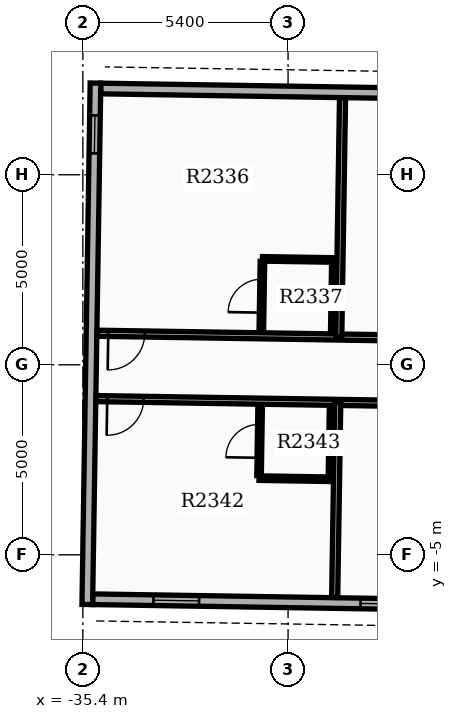
"""IFC4 building model, lengths in metres.
Left out: names, types, materials, properties, quantities, classifications, styles, units other than length and angle.
Written with IfcOpenShell. Run it as: python <this file> out.ifc"""

import sys

from ifc_helpers import new_model, si_unit, direction, frame, frame_2d, origin, place, context, subcontext, project, spatial, rectangle, extrude, element, fill, save


model = new_model("IFC4")
c1 = context("Model", 3, precision=1e-05, world=origin(), true_north=direction((0.0, 1.0)))
c2 = subcontext(c1, "Body", "Model", "MODEL_VIEW")
j1 = project(units=[si_unit("LENGTHUNIT", "METRE"), si_unit("PLANEANGLEUNIT", "RADIAN")], contexts=[c1])
p1 = place(None, origin())
s1 = spatial("IfcSite", under=j1, at=p1, CompositionType="ELEMENT")
p2 = place(p1, origin())
s2 = spatial("IfcBuilding", under=s1, at=p2, CompositionType="ELEMENT")
p3 = place(p2, frame((0.0, 0.0, 148.8)))
s3 = spatial("IfcBuildingStorey", under=s2, at=p3, CompositionType="ELEMENT", Elevation=148.8)
p4 = place(p3, frame((-14.833, 6.954, 0.0), z_axis=(0.0, 0.0, 1.0), x_axis=(-0.999876667941, 0.015705059908, 0.0)))
e1 = element("IfcWall", 1, at=p4, inside=s3, PredefinedType="STANDARD", context=c2, shape_type="SweptSolid", body=[
    extrude(rectangle(XDim=20.1, YDim=0.28, at=frame_2d((10.05, 0.0))), origin(), (0.0, 0.0, 1.0), 2.97),
])
p5 = place(p4, frame((1.6, 0.0, 0.8)))
e2 = element("IfcOpeningElement", 2, at=p5, cuts=e1, PredefinedType="OPENING", context=c2, shape_type="SweptSolid", body=[
    extrude(rectangle(XDim=1.2, YDim=1.6, at=frame_2d((0.6, 0.8))), frame((0.0, 0.15, 0.0), z_axis=(0.0, -1.0, 0.0), x_axis=(1.0, 0.0, 0.0)), (0.0, 0.0, 1.0), 0.3),
])
p6 = place(p4, frame((4.8, 0.0, 0.8)))
e3 = element("IfcOpeningElement", 3, at=p6, cuts=e1, PredefinedType="OPENING", context=c2, shape_type="SweptSolid", body=[
    extrude(rectangle(XDim=1.2, YDim=1.6, at=frame_2d((0.6, 0.8))), frame((0.0, 0.15, 0.0), z_axis=(0.0, -1.0, 0.0), x_axis=(1.0, 0.0, 0.0)), (0.0, 0.0, 1.0), 0.3),
])
p7 = place(p4, frame((8.0, 0.0, 0.8)))
e4 = element("IfcOpeningElement", 4, at=p7, cuts=e1, PredefinedType="OPENING", context=c2, shape_type="SweptSolid", body=[
    extrude(rectangle(XDim=1.2, YDim=1.6, at=frame_2d((0.6, 0.8))), frame((0.0, 0.15, 0.0), z_axis=(0.0, -1.0, 0.0), x_axis=(1.0, 0.0, 0.0)), (0.0, 0.0, 1.0), 0.3),
])
p8 = place(p4, frame((11.2, 0.0, 0.8)))
e5 = element("IfcOpeningElement", 5, at=p8, cuts=e1, PredefinedType="OPENING", context=c2, shape_type="SweptSolid", body=[
    extrude(rectangle(XDim=1.2, YDim=1.6, at=frame_2d((0.6, 0.8))), frame((0.0, 0.15, 0.0), z_axis=(0.0, -1.0, 0.0), x_axis=(1.0, 0.0, 0.0)), (0.0, 0.0, 1.0), 0.3),
])
p9 = place(p3, frame((-35.141, -6.169, 0.0), z_axis=(0.0, 0.0, 1.0), x_axis=(0.999876474133, -0.01571739401, 0.0)))
e6 = element("IfcWall", 6, at=p9, inside=s3, PredefinedType="STANDARD", context=c2, shape_type="SweptSolid", body=[
    extrude(rectangle(XDim=20.1, YDim=0.28, at=frame_2d((10.05, 0.0))), origin(), (0.0, 0.0, 1.0), 2.97),
])
p10 = place(p9, frame((1.6, 0.0, 0.8)))
e7 = element("IfcOpeningElement", 7, at=p10, cuts=e6, PredefinedType="OPENING", context=c2, shape_type="SweptSolid", body=[
    extrude(rectangle(XDim=1.2, YDim=1.6, at=frame_2d((0.6, 0.8))), frame((0.0, 0.15, 0.0), z_axis=(0.0, -1.0, 0.0), x_axis=(1.0, 0.0, 0.0)), (0.0, 0.0, 1.0), 0.3),
])
p11 = place(p9, frame((7.05, 0.0, 0.8)))
e8 = element("IfcOpeningElement", 8, at=p11, cuts=e6, PredefinedType="OPENING", context=c2, shape_type="SweptSolid", body=[
    extrude(rectangle(XDim=1.2, YDim=1.6, at=frame_2d((0.6, 0.8))), frame((0.0, 0.15, 0.0), z_axis=(0.0, -1.0, 0.0), x_axis=(1.0, 0.0, 0.0)), (0.0, 0.0, 1.0), 0.3),
])
p12 = place(p9, frame((10.25, 0.0, 0.8)))
e9 = element("IfcOpeningElement", 9, at=p12, cuts=e6, PredefinedType="OPENING", context=c2, shape_type="SweptSolid", body=[
    extrude(rectangle(XDim=1.2, YDim=1.6, at=frame_2d((0.6, 0.8))), frame((0.0, 0.15, 0.0), z_axis=(0.0, -1.0, 0.0), x_axis=(1.0, 0.0, 0.0)), (0.0, 0.0, 1.0), 0.3),
])
p13 = place(p9, frame((13.95, 0.0, 0.8)))
e10 = element("IfcOpeningElement", 10, at=p13, cuts=e6, PredefinedType="OPENING", context=c2, shape_type="SweptSolid", body=[
    extrude(rectangle(XDim=1.2, YDim=1.6, at=frame_2d((0.6, 0.8))), frame((0.0, 0.15, 0.0), z_axis=(0.0, -1.0, 0.0), x_axis=(1.0, 0.0, 0.0)), (0.0, 0.0, 1.0), 0.3),
])
p14 = place(p3, frame((-35.068, 7.412, 0.0), z_axis=(0.0, 0.0, 1.0), x_axis=(-0.015712599986, -0.999876549481, 0.0)))
e11 = element("IfcWall", 11, at=p14, inside=s3, PredefinedType="STANDARD", context=c2, shape_type="SweptSolid", body=[
    extrude(rectangle(XDim=13.72, YDim=0.28, at=frame_2d((6.86, 0.0))), origin(), (0.0, 0.0, 1.0), 2.97),
])
p15 = place(p14, frame((0.85, 0.0, 0.85)))
e12 = element("IfcOpeningElement", 12, at=p15, cuts=e11, PredefinedType="OPENING", context=c2, shape_type="SweptSolid", body=[
    extrude(rectangle(XDim=1.0, YDim=1.5, at=frame_2d((0.5, 0.75))), frame((0.0, 0.15, 0.0), z_axis=(0.0, -1.0, 0.0), x_axis=(1.0, 0.0, 0.0)), (0.0, 0.0, 1.0), 0.3),
])
p16 = place(p3, frame((-14.844, 0.513, 0.0), z_axis=(0.0, 0.0, 1.0), x_axis=(-0.999876717676, 0.015701893165, 0.0)))
e13 = element("IfcWall", 13, at=p16, inside=s3, PredefinedType="PARTITIONING", context=c2, shape_type="SweptSolid", body=[
    extrude(rectangle(XDim=20.182, YDim=0.16, at=frame_2d((10.091, 0.0))), origin(), (0.0, 0.0, 1.0), 2.96),
])
p17 = place(p16, frame((2.661, 0.0, 0.0)))
e14 = element("IfcOpeningElement", 14, at=p17, cuts=e13, PredefinedType="OPENING", context=c2, shape_type="SweptSolid", body=[
    extrude(rectangle(XDim=0.96, YDim=2.15, at=frame_2d((0.48, 1.075))), frame((0.0, 0.09, 0.0), z_axis=(0.0, -1.0, 0.0), x_axis=(1.0, 0.0, 0.0)), (0.0, 0.0, 1.0), 0.18),
])
p18 = place(p16, frame((9.492, 0.0, 0.0)))
e15 = element("IfcOpeningElement", 15, at=p18, cuts=e13, PredefinedType="OPENING", context=c2, shape_type="SweptSolid", body=[
    extrude(rectangle(XDim=0.96, YDim=2.15, at=frame_2d((0.48, 1.075))), frame((0.0, 0.09, 0.0), z_axis=(0.0, -1.0, 0.0), x_axis=(1.0, 0.0, 0.0)), (0.0, 0.0, 1.0), 0.18),
])
p19 = place(p16, frame((18.93, 0.0, 0.0)))
e16 = element("IfcOpeningElement", 16, at=p19, cuts=e13, PredefinedType="OPENING", context=c2, shape_type="SweptSolid", body=[
    extrude(rectangle(XDim=0.96, YDim=2.15, at=frame_2d((0.48, 1.075))), frame((0.0, 0.09, 0.0), z_axis=(0.0, -1.0, 0.0), x_axis=(1.0, 0.0, 0.0)), (0.0, 0.0, 1.0), 0.18),
])
p20 = place(p3, frame((-28.666, 0.73, 0.0), z_axis=(0.0, 0.0, 1.0), x_axis=(0.01571522764, 0.999876508185, 0.0)))
e17 = element("IfcWall", 17, at=p20, inside=s3, PredefinedType="PARTITIONING", context=c2, shape_type="SweptSolid", body=[
    extrude(rectangle(XDim=6.292, YDim=0.16, at=frame_2d((3.146, 0.0))), origin(), (0.0, 0.0, 1.0), 2.96),
])
p21 = place(p3, frame((-30.704, 0.902, 0.0), z_axis=(0.0, 0.0, 1.0), x_axis=(0.015694337248, 0.999876836305, 0.0)))
e18 = element("IfcWall", 18, at=p21, inside=s3, PredefinedType="PARTITIONING", context=c2, shape_type="SweptSolid", body=[
    extrude(rectangle(XDim=1.82, YDim=0.12, at=frame_2d((0.91, 0.0))), origin(), (0.0, 0.0, 1.0), 2.96),
])
p22 = place(p21, frame((0.47, 0.0, 0.0)))
e19 = element("IfcOpeningElement", 19, at=p22, cuts=e18, PredefinedType="OPENING", context=c2, shape_type="SweptSolid", body=[
    extrude(rectangle(XDim=0.88, YDim=2.1, at=frame_2d((0.44, 1.05))), frame((0.0, 0.07, 0.0), z_axis=(0.0, -1.0, 0.0), x_axis=(1.0, 0.0, 0.0)), (0.0, 0.0, 1.0), 0.14),
])
p23 = place(p3, frame((-28.824, 0.873, 0.0), z_axis=(0.0, 0.0, 1.0), x_axis=(0.015560230231, 0.999878932289, 0.0)))
e20 = element("IfcWall", 20, at=p23, inside=s3, PredefinedType="PARTITIONING", context=c2, shape_type="SweptSolid", body=[
    extrude(rectangle(XDim=1.82, YDim=0.12, at=frame_2d((0.91, 0.0))), origin(), (0.0, 0.0, 1.0), 2.96),
])
p24 = place(p3, frame((-28.794, 2.758, 0.0), z_axis=(0.0, 0.0, 1.0), x_axis=(-0.999876553475, 0.01571234584, 0.0)))
e21 = element("IfcWall", 21, at=p24, inside=s3, PredefinedType="PARTITIONING", context=c2, shape_type="SweptSolid", body=[
    extrude(rectangle(XDim=1.88, YDim=0.12, at=frame_2d((0.94, 0.0))), origin(), (0.0, 0.0, 1.0), 2.96),
])
p25 = place(p3, frame((-14.871, -1.207, 0.0), z_axis=(0.0, 0.0, 1.0), x_axis=(-0.999876527681, 0.015713987169, 0.0)))
e22 = element("IfcWall", 22, at=p25, inside=s3, PredefinedType="PARTITIONING", context=c2, shape_type="SweptSolid", body=[
    extrude(rectangle(XDim=20.182, YDim=0.16, at=frame_2d((10.091, 0.0))), origin(), (0.0, 0.0, 1.0), 2.96),
])
p26 = place(p25, frame((2.661, 0.0, 0.0)))
e23 = element("IfcOpeningElement", 23, at=p26, cuts=e22, PredefinedType="OPENING", context=c2, shape_type="SweptSolid", body=[
    extrude(rectangle(XDim=0.96, YDim=2.15, at=frame_2d((0.48, 1.075))), frame((0.0, 0.09, 0.0), z_axis=(0.0, -1.0, 0.0), x_axis=(1.0, 0.0, 0.0)), (0.0, 0.0, 1.0), 0.18),
])
p27 = place(p25, frame((9.492, 0.0, 0.0)))
e24 = element("IfcOpeningElement", 24, at=p27, cuts=e22, PredefinedType="OPENING", context=c2, shape_type="SweptSolid", body=[
    extrude(rectangle(XDim=0.96, YDim=2.15, at=frame_2d((0.48, 1.075))), frame((0.0, 0.09, 0.0), z_axis=(0.0, -1.0, 0.0), x_axis=(1.0, 0.0, 0.0)), (0.0, 0.0, 1.0), 0.18),
])
p28 = place(p25, frame((18.93, 0.0, 0.0)))
e25 = element("IfcOpeningElement", 25, at=p28, cuts=e22, PredefinedType="OPENING", context=c2, shape_type="SweptSolid", body=[
    extrude(rectangle(XDim=0.96, YDim=2.15, at=frame_2d((0.48, 1.075))), frame((0.0, 0.09, 0.0), z_axis=(0.0, -1.0, 0.0), x_axis=(1.0, 0.0, 0.0)), (0.0, 0.0, 1.0), 0.18),
])
p29 = place(p3, frame((-28.693, -0.99, 0.0), z_axis=(0.0, 0.0, 1.0), x_axis=(-0.015698892967, -0.999876764786, 0.0)))
e26 = element("IfcWall", 26, at=p29, inside=s3, PredefinedType="PARTITIONING", context=c2, shape_type="SweptSolid", body=[
    extrude(rectangle(XDim=5.132, YDim=0.16, at=frame_2d((2.566, 0.0))), origin(), (0.0, 0.0, 1.0), 2.96),
])
p30 = place(p3, frame((-30.764, -2.917, 0.0), z_axis=(0.0, 0.0, 1.0), x_axis=(0.015696442504, 0.999876803258, 0.0)))
e27 = element("IfcWall", 27, at=p30, inside=s3, PredefinedType="PARTITIONING", context=c2, shape_type="SweptSolid", body=[
    extrude(rectangle(XDim=1.82, YDim=0.12, at=frame_2d((0.91, 0.0))), origin(), (0.0, 0.0, 1.0), 2.96),
])
p31 = place(p30, frame((0.47, 0.0, 0.0)))
e28 = element("IfcOpeningElement", 28, at=p31, cuts=e27, PredefinedType="OPENING", context=c2, shape_type="SweptSolid", body=[
    extrude(rectangle(XDim=0.88, YDim=2.1, at=frame_2d((0.44, 1.05))), frame((0.0, 0.07, 0.0), z_axis=(0.0, -1.0, 0.0), x_axis=(1.0, 0.0, 0.0)), (0.0, 0.0, 1.0), 0.14),
])
p32 = place(p3, frame((-28.884, -2.947, 0.0), z_axis=(0.0, 0.0, 1.0), x_axis=(0.015694337248, 0.999876836305, 0.0)))
e29 = element("IfcWall", 29, at=p32, inside=s3, PredefinedType="PARTITIONING", context=c2, shape_type="SweptSolid", body=[
    extrude(rectangle(XDim=1.82, YDim=0.12, at=frame_2d((0.91, 0.0))), origin(), (0.0, 0.0, 1.0), 2.96),
])
p33 = place(p3, frame((-28.885, -3.012, 0.0), z_axis=(0.0, 0.0, 1.0), x_axis=(-0.99987652141, 0.015714386166, 0.0)))
e30 = element("IfcWall", 30, at=p33, inside=s3, PredefinedType="PARTITIONING", context=c2, shape_type="SweptSolid", body=[
    extrude(rectangle(XDim=1.88, YDim=0.12, at=frame_2d((0.94, 0.0))), origin(), (0.0, 0.0, 1.0), 2.96),
])
p34 = place(p10, origin())
e31 = element("IfcWindow", 31, at=p34, inside=s3, PartitioningType="SINGLE_PANEL", PredefinedType="WINDOW", context=c2, shape_type="SweptSolid", body=[
    extrude(rectangle(XDim=1.2, YDim=1.6, at=frame_2d((0.6, 0.8))), frame((0.0, 0.03, 0.0), z_axis=(0.0, -1.0, 0.0), x_axis=(1.0, 0.0, 0.0)), (0.0, 0.0, 1.0), 0.06),
])
fill(e7, e31)
p35 = place(p11, origin())
e32 = element("IfcWindow", 32, at=p35, inside=s3, PartitioningType="SINGLE_PANEL", PredefinedType="WINDOW", context=c2, shape_type="SweptSolid", body=[
    extrude(rectangle(XDim=1.2, YDim=1.6, at=frame_2d((0.6, 0.8))), frame((0.0, 0.03, 0.0), z_axis=(0.0, -1.0, 0.0), x_axis=(1.0, 0.0, 0.0)), (0.0, 0.0, 1.0), 0.06),
])
fill(e8, e32)
p36 = place(p15, origin())
e33 = element("IfcWindow", 33, at=p36, inside=s3, PartitioningType="SINGLE_PANEL", PredefinedType="WINDOW", context=c2, shape_type="SweptSolid", body=[
    extrude(rectangle(XDim=1.0, YDim=1.5, at=frame_2d((0.5, 0.75))), frame((0.0, 0.03, 0.0), z_axis=(0.0, -1.0, 0.0), x_axis=(1.0, 0.0, 0.0)), (0.0, 0.0, 1.0), 0.06),
])
fill(e12, e33)
p37 = place(p19, origin())
e34 = element("IfcDoor", 34, at=p37, inside=s3, OperationType="SINGLE_SWING_RIGHT", PredefinedType="DOOR", context=c2, shape_type="SweptSolid", body=[
    extrude(rectangle(XDim=0.96, YDim=2.15, at=frame_2d((0.48, 1.075))), frame((0.0, 0.025, 0.0), z_axis=(0.0, -1.0, 0.0), x_axis=(1.0, 0.0, 0.0)), (0.0, 0.0, 1.0), 0.05),
])
fill(e16, e34)
p38 = place(p22, origin())
e35 = element("IfcDoor", 35, at=p38, inside=s3, OperationType="SINGLE_SWING_LEFT", PredefinedType="DOOR", context=c2, shape_type="SweptSolid", body=[
    extrude(rectangle(XDim=0.88, YDim=2.1, at=frame_2d((0.44, 1.05))), frame((0.0, 0.025, 0.0), z_axis=(0.0, -1.0, 0.0), x_axis=(1.0, 0.0, 0.0)), (0.0, 0.0, 1.0), 0.05),
])
fill(e19, e35)
p39 = place(p28, origin())
e36 = element("IfcDoor", 36, at=p39, inside=s3, OperationType="SINGLE_SWING_RIGHT", PredefinedType="DOOR", context=c2, shape_type="SweptSolid", body=[
    extrude(rectangle(XDim=0.96, YDim=2.15, at=frame_2d((0.48, 1.075))), frame((0.0, 0.025, 0.0), z_axis=(0.0, -1.0, 0.0), x_axis=(1.0, 0.0, 0.0)), (0.0, 0.0, 1.0), 0.05),
])
fill(e25, e36)
p40 = place(p31, origin())
e37 = element("IfcDoor", 37, at=p40, inside=s3, OperationType="SINGLE_SWING_LEFT", PredefinedType="DOOR", context=c2, shape_type="SweptSolid", body=[
    extrude(rectangle(XDim=0.88, YDim=2.1, at=frame_2d((0.44, 1.05))), frame((0.0, 0.025, 0.0), z_axis=(0.0, -1.0, 0.0), x_axis=(1.0, 0.0, 0.0)), (0.0, 0.0, 1.0), 0.05),
])
fill(e28, e37)
save(model, sys.argv[1])
